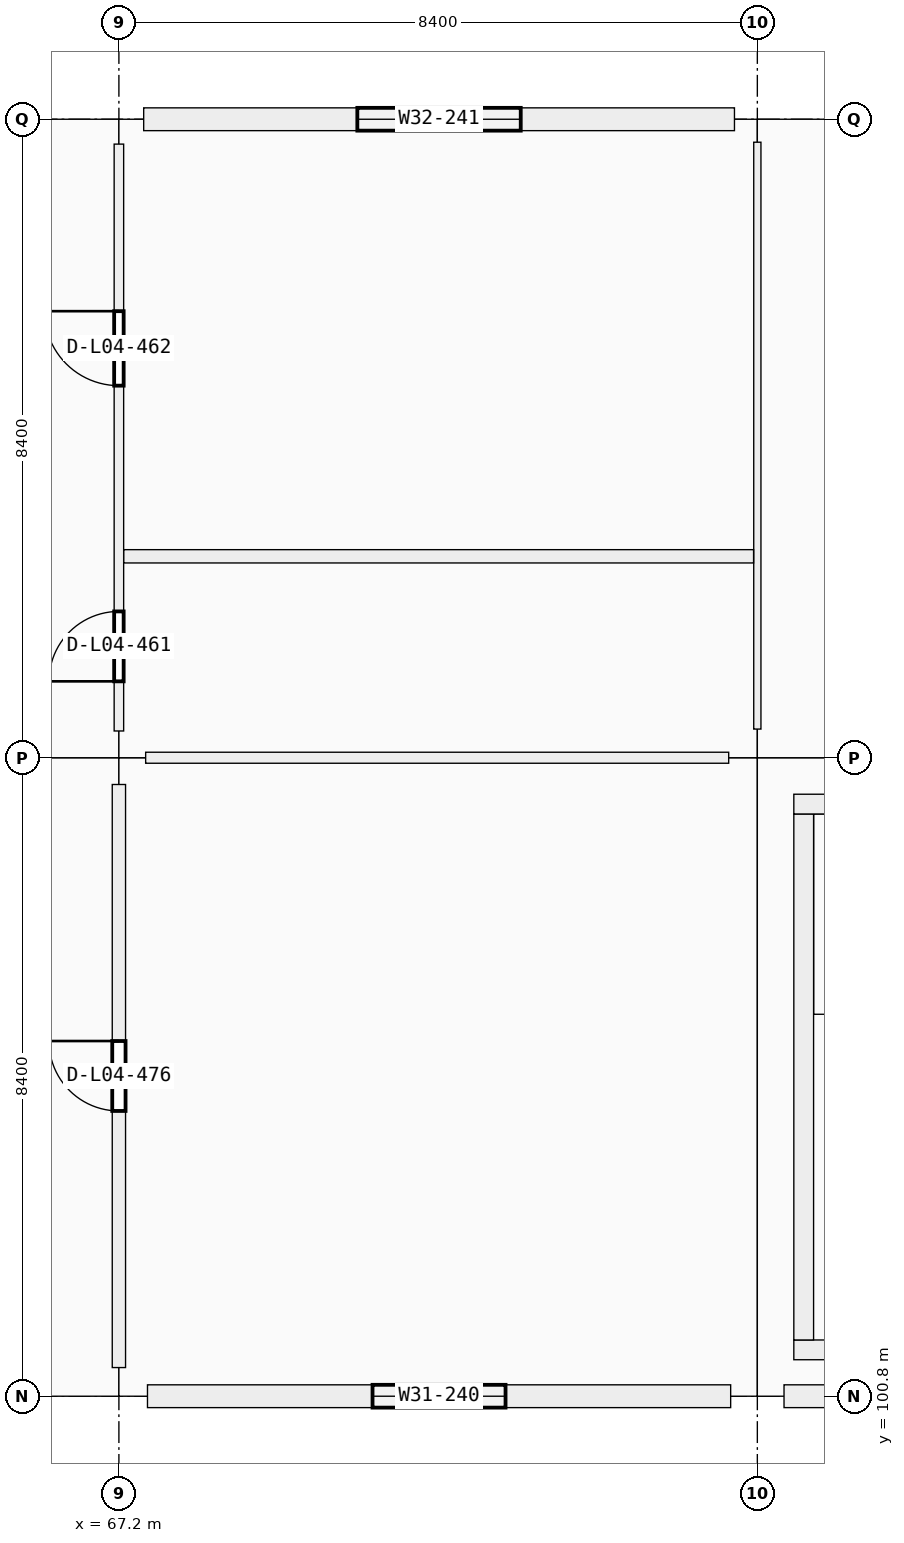
"""IFC4 building model, lengths in metres.
Left out: names, types, materials, properties, quantities, classifications, styles, units other than length and angle.
Written with IfcOpenShell. Run it as: python <this file> out.ifc"""

import sys

from ifc_helpers import new_model, si_unit, direction, frame, frame_2d, origin, origin_2d, place, context, subcontext, project, spatial, rectangle, extrude, element, fill, save


model = new_model("IFC4")
c1 = context("Model", 3, precision=1e-05, world=origin(), true_north=direction((0.0, 1.0)))
c2 = subcontext(c1, "Body", "Model", "MODEL_VIEW")
j1 = project(units=[si_unit("LENGTHUNIT", "METRE"), si_unit("PLANEANGLEUNIT", "RADIAN")], contexts=[c1])
p1 = place(None, origin())
s1 = spatial("IfcSite", under=j1, at=p1, CompositionType="ELEMENT")
p2 = place(p1, origin())
s2 = spatial("IfcBuilding", under=s1, at=p2, CompositionType="ELEMENT")
p3 = place(p2, frame((0.0, 0.0, 19.08)))
s3 = spatial("IfcBuildingStorey", under=s2, at=p3, CompositionType="ELEMENT", Elevation=19.08)
p4 = place(p3, frame((67.2, 100.8, 0.0), z_axis=(0.0, 0.0, 1.0), x_axis=(1.0, 0.0, 0.0)))
e1 = element("IfcColumn", 1, at=p4, inside=s3, PredefinedType="COLUMN", context=c2, shape_type="SweptSolid", body=[
    extrude(rectangle(XDim=0.75, YDim=0.75, at=origin_2d()), origin(), (0.0, 0.0, 1.0), 4.32),
])
p5 = place(p3, frame((67.2, 109.2, 0.0), z_axis=(0.0, 0.0, 1.0), x_axis=(1.0, 0.0, 0.0)))
e2 = element("IfcColumn", 2, at=p5, inside=s3, PredefinedType="COLUMN", context=c2, shape_type="SweptSolid", body=[
    extrude(rectangle(XDim=0.7, YDim=0.7, at=origin_2d()), origin(), (0.0, 0.0, 1.0), 4.32),
])
p6 = place(p3, frame((67.2, 117.6, 0.0), z_axis=(0.0, 0.0, 1.0), x_axis=(1.0, 0.0, 0.0)))
e3 = element("IfcColumn", 3, at=p6, inside=s3, PredefinedType="COLUMN", context=c2, shape_type="SweptSolid", body=[
    extrude(rectangle(XDim=0.65, YDim=0.65, at=origin_2d()), origin(), (0.0, 0.0, 1.0), 4.32),
])
p7 = place(p3, frame((75.6, 100.8, 0.0), z_axis=(0.0, 0.0, 1.0), x_axis=(1.0, 0.0, 0.0)))
e4 = element("IfcColumn", 4, at=p7, inside=s3, PredefinedType="COLUMN", context=c2, shape_type="SweptSolid", body=[
    extrude(rectangle(XDim=0.7, YDim=0.7, at=origin_2d()), origin(), (0.0, 0.0, 1.0), 4.32),
])
p8 = place(p3, frame((75.6, 109.2, 0.0), z_axis=(0.0, 0.0, 1.0), x_axis=(1.0, 0.0, 0.0)))
e5 = element("IfcColumn", 5, at=p8, inside=s3, PredefinedType="COLUMN", context=c2, shape_type="SweptSolid", body=[
    extrude(rectangle(XDim=0.75, YDim=0.75, at=origin_2d()), origin(), (0.0, 0.0, 1.0), 4.32),
])
p9 = place(p3, frame((75.6, 117.6, 0.0), z_axis=(0.0, 0.0, 1.0), x_axis=(1.0, 0.0, 0.0)))
e6 = element("IfcColumn", 6, at=p9, inside=s3, PredefinedType="COLUMN", context=c2, shape_type="SweptSolid", body=[
    extrude(rectangle(XDim=0.6, YDim=0.6, at=origin_2d()), origin(), (0.0, 0.0, 1.0), 4.32),
])
p10 = place(p3, frame((75.249, 100.8, 0.0), z_axis=(0.0, 0.0, 1.0), x_axis=(-1.0, 0.0, 0.0)))
e7 = element("IfcWall", 7, at=p10, inside=s3, PredefinedType="SOLIDWALL", context=c2, shape_type="SweptSolid", body=[
    extrude(rectangle(XDim=7.673, YDim=0.3, at=frame_2d((3.836, 0.0))), origin(), (0.0, 0.0, 1.0), 3.37),
])
p11 = place(p10, frame((2.962, 0.0, 0.9)))
e8 = element("IfcOpeningElement", 8, at=p11, cuts=e7, PredefinedType="OPENING", context=c2, shape_type="SweptSolid", body=[
    extrude(rectangle(XDim=1.75, YDim=1.95, at=frame_2d((0.875, 0.975))), frame((0.0, 0.15, 0.0), z_axis=(0.0, -1.0, 0.0), x_axis=(1.0, 0.0, 0.0)), (0.0, 0.0, 1.0), 0.3),
])
p12 = place(p3, frame((67.526, 117.6, 0.0), z_axis=(0.0, 0.0, 1.0), x_axis=(1.0, 0.0, 0.0)))
e9 = element("IfcWall", 9, at=p12, inside=s3, PredefinedType="SOLIDWALL", context=c2, shape_type="SweptSolid", body=[
    extrude(rectangle(XDim=7.773, YDim=0.3, at=frame_2d((3.887, 0.0))), origin(), (0.0, 0.0, 1.0), 3.37),
])
p13 = place(p12, frame((2.811, 0.0, 0.9)))
e10 = element("IfcOpeningElement", 10, at=p13, cuts=e9, PredefinedType="OPENING", context=c2, shape_type="SweptSolid", body=[
    extrude(rectangle(XDim=2.15, YDim=1.95, at=frame_2d((1.075, 0.975))), frame((0.0, 0.15, 0.0), z_axis=(0.0, -1.0, 0.0), x_axis=(1.0, 0.0, 0.0)), (0.0, 0.0, 1.0), 0.3),
])
p14 = place(p3, frame((83.624, 100.8, 0.0), z_axis=(0.0, 0.0, 1.0), x_axis=(-1.0, 0.0, 0.0)))
e11 = element("IfcWall", 11, at=p14, inside=s3, PredefinedType="SOLIDWALL", context=c2, shape_type="SweptSolid", body=[
    extrude(rectangle(XDim=7.673, YDim=0.3, at=frame_2d((3.836, 0.0))), origin(), (0.0, 0.0, 1.0), 3.37),
])
p15 = place(p3, frame((83.52, 101.41, 0.0), z_axis=(0.0, 0.0, 1.0), x_axis=(-1.0, 0.0, 0.0)))
e12 = element("IfcWall", 12, at=p15, inside=s3, PredefinedType="SHEAR", context=c2, shape_type="SweptSolid", body=[
    extrude(rectangle(XDim=7.44, YDim=0.26, at=frame_2d((3.72, 0.0))), origin(), (0.0, 0.0, 1.0), 4.32),
])
p16 = place(p3, frame((76.21, 101.54, 0.0), z_axis=(0.0, 0.0, 1.0), x_axis=(0.0, 1.0, 0.0)))
e13 = element("IfcWall", 13, at=p16, inside=s3, PredefinedType="SHEAR", context=c2, shape_type="SweptSolid", body=[
    extrude(rectangle(XDim=6.92, YDim=0.26, at=frame_2d((3.46, 0.0))), origin(), (0.0, 0.0, 1.0), 4.32),
])
p17 = place(p3, frame((76.08, 108.59, 0.0), z_axis=(0.0, 0.0, 1.0), x_axis=(1.0, 0.0, 0.0)))
e14 = element("IfcWall", 14, at=p17, inside=s3, PredefinedType="SHEAR", context=c2, shape_type="SweptSolid", body=[
    extrude(rectangle(XDim=7.44, YDim=0.26, at=frame_2d((3.72, 0.0))), origin(), (0.0, 0.0, 1.0), 4.32),
])
p18 = place(p3, frame((67.552, 109.2, 0.0), z_axis=(0.0, 0.0, 1.0), x_axis=(1.0, 0.0, 0.0)))
e15 = element("IfcWall", 15, at=p18, inside=s3, PredefinedType="PARTITIONING", context=c2, shape_type="SweptSolid", body=[
    extrude(rectangle(XDim=7.671, YDim=0.145, at=frame_2d((3.835, 0.0))), origin(), (0.0, 0.0, 1.0), 3.19),
])
p19 = place(p3, frame((67.2, 101.177, 0.0), z_axis=(0.0, 0.0, 1.0), x_axis=(0.0, 1.0, 0.0)))
e16 = element("IfcWall", 16, at=p19, inside=s3, PredefinedType="PARTITIONING", context=c2, shape_type="SweptSolid", body=[
    extrude(rectangle(XDim=7.671, YDim=0.175, at=frame_2d((3.835, 0.0))), origin(), (0.0, 0.0, 1.0), 3.19),
])
p20 = place(p19, frame((3.376, 0.0, 0.0)))
e17 = element("IfcOpeningElement", 17, at=p20, cuts=e16, PredefinedType="OPENING", context=c2, shape_type="SweptSolid", body=[
    extrude(rectangle(XDim=0.92, YDim=2.15, at=frame_2d((0.46, 1.075))), frame((0.0, 0.087, 0.0), z_axis=(0.0, -1.0, 0.0), x_axis=(1.0, 0.0, 0.0)), (0.0, 0.0, 1.0), 0.175),
])
p21 = place(p3, frame((67.2, 109.552, 0.0), z_axis=(0.0, 0.0, 1.0), x_axis=(0.0, 1.0, 0.0)))
e18 = element("IfcWall", 18, at=p21, inside=s3, PredefinedType="PARTITIONING", context=c2, shape_type="SweptSolid", body=[
    extrude(rectangle(XDim=7.721, YDim=0.125, at=frame_2d((3.86, 0.0))), origin(), (0.0, 0.0, 1.0), 3.19),
])
p22 = place(p21, frame((0.653, 0.0, 0.0)))
e19 = element("IfcOpeningElement", 19, at=p22, cuts=e18, PredefinedType="OPENING", context=c2, shape_type="SweptSolid", body=[
    extrude(rectangle(XDim=0.92, YDim=2.1, at=frame_2d((0.46, 1.05))), frame((0.0, 0.062, 0.0), z_axis=(0.0, -1.0, 0.0), x_axis=(1.0, 0.0, 0.0)), (0.0, 0.0, 1.0), 0.125),
])
p23 = place(p21, frame((4.543, 0.0, 0.0)))
e20 = element("IfcOpeningElement", 20, at=p23, cuts=e18, PredefinedType="OPENING", context=c2, shape_type="SweptSolid", body=[
    extrude(rectangle(XDim=0.98, YDim=2.08, at=frame_2d((0.49, 1.04))), frame((0.0, 0.062, 0.0), z_axis=(0.0, -1.0, 0.0), x_axis=(1.0, 0.0, 0.0)), (0.0, 0.0, 1.0), 0.125),
])
p24 = place(p3, frame((75.6, 109.577, 0.0), z_axis=(0.0, 0.0, 1.0), x_axis=(0.0, 1.0, 0.0)))
e21 = element("IfcWall", 21, at=p24, inside=s3, PredefinedType="PARTITIONING", context=c2, shape_type="SweptSolid", body=[
    extrude(rectangle(XDim=7.721, YDim=0.095, at=frame_2d((3.861, 0.0))), origin(), (0.0, 0.0, 1.0), 3.19),
])
p25 = place(p3, frame((67.264, 111.85, 0.0), z_axis=(0.0, 0.0, 1.0), x_axis=(1.0, 0.0, 0.0)))
e22 = element("IfcWall", 22, at=p25, inside=s3, PredefinedType="PARTITIONING", context=c2, shape_type="SweptSolid", body=[
    extrude(rectangle(XDim=8.286, YDim=0.175, at=frame_2d((4.143, 0.0))), origin(), (0.0, 0.0, 1.0), 3.19),
])
p26 = place(p11, origin())
e23 = element("IfcWindow", 23, at=p26, inside=s3, PartitioningType="SINGLE_PANEL", PredefinedType="WINDOW", context=c2, shape_type="SweptSolid", body=[
    extrude(rectangle(XDim=1.75, YDim=1.95, at=frame_2d((0.875, 0.975))), frame((0.0, 0.03, 0.0), z_axis=(0.0, -1.0, 0.0), x_axis=(1.0, 0.0, 0.0)), (0.0, 0.0, 1.0), 0.06),
])
fill(e8, e23)
p27 = place(p13, origin())
e24 = element("IfcWindow", 24, at=p27, inside=s3, PartitioningType="SINGLE_PANEL", PredefinedType="WINDOW", context=c2, shape_type="SweptSolid", body=[
    extrude(rectangle(XDim=2.15, YDim=1.95, at=frame_2d((1.075, 0.975))), frame((0.0, 0.03, 0.0), z_axis=(0.0, -1.0, 0.0), x_axis=(1.0, 0.0, 0.0)), (0.0, 0.0, 1.0), 0.06),
])
fill(e10, e24)
p28 = place(p22, origin())
e25 = element("IfcDoor", 25, at=p28, inside=s3, OperationType="SINGLE_SWING_LEFT", PredefinedType="DOOR", context=c2, shape_type="SweptSolid", body=[
    extrude(rectangle(XDim=0.92, YDim=2.1, at=frame_2d((0.46, 1.05))), frame((0.0, 0.025, 0.0), z_axis=(0.0, -1.0, 0.0), x_axis=(1.0, 0.0, 0.0)), (0.0, 0.0, 1.0), 0.05),
])
fill(e19, e25)
p29 = place(p23, origin())
e26 = element("IfcDoor", 26, at=p29, inside=s3, OperationType="SINGLE_SWING_RIGHT", PredefinedType="DOOR", context=c2, shape_type="SweptSolid", body=[
    extrude(rectangle(XDim=0.98, YDim=2.08, at=frame_2d((0.49, 1.04))), frame((0.0, 0.025, 0.0), z_axis=(0.0, -1.0, 0.0), x_axis=(1.0, 0.0, 0.0)), (0.0, 0.0, 1.0), 0.05),
])
fill(e20, e26)
p30 = place(p20, origin())
e27 = element("IfcDoor", 27, at=p30, inside=s3, OperationType="SINGLE_SWING_RIGHT", PredefinedType="DOOR", context=c2, shape_type="SweptSolid", body=[
    extrude(rectangle(XDim=0.92, YDim=2.15, at=frame_2d((0.46, 1.075))), frame((0.0, 0.025, 0.0), z_axis=(0.0, -1.0, 0.0), x_axis=(1.0, 0.0, 0.0)), (0.0, 0.0, 1.0), 0.05),
])
fill(e17, e27)
save(model, sys.argv[1])
